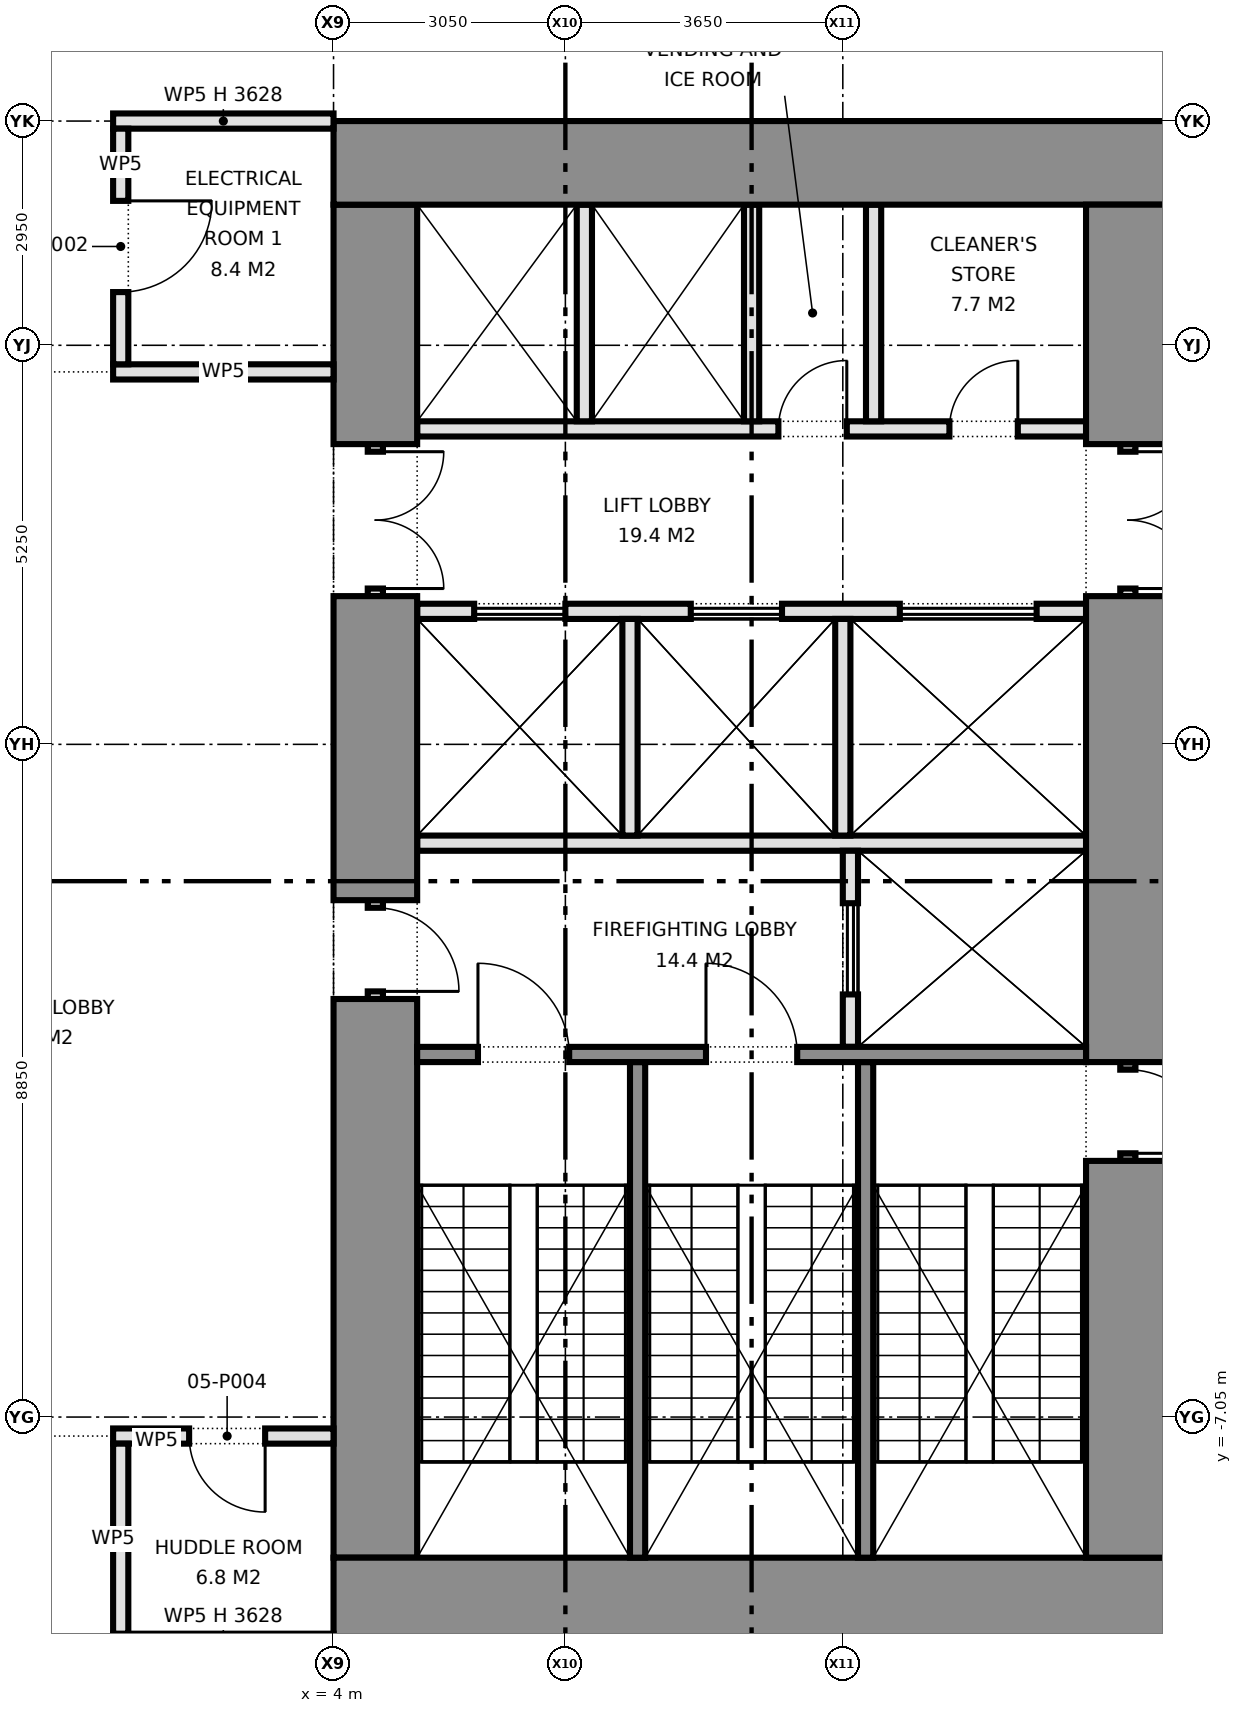
"""IFC4 building model, lengths in metres.
Left out: names, types, materials, properties, quantities, classifications, styles, units other than length and angle.
Written with IfcOpenShell. Run it as: python <this file> out.ifc"""

import sys

from ifc_helpers import new_model, si_unit, direction, frame, frame_2d, origin, place, context, subcontext, project, spatial, rectangle, extrude, element, fill, save


model = new_model("IFC4")
c1 = context("Model", 3, precision=1e-05, world=origin(), true_north=direction((0.0, 1.0)))
c2 = subcontext(c1, "Body", "Model", "MODEL_VIEW")
j1 = project(units=[si_unit("LENGTHUNIT", "METRE"), si_unit("PLANEANGLEUNIT", "RADIAN")], contexts=[c1])
p1 = place(None, origin())
s1 = spatial("IfcSite", under=j1, at=p1, CompositionType="ELEMENT")
p2 = place(p1, origin())
s2 = spatial("IfcBuilding", under=s1, at=p2, CompositionType="ELEMENT")
p3 = place(p2, frame((0.0, 0.0, 20.9)))
s3 = spatial("IfcBuildingStorey", under=s2, at=p3, CompositionType="ELEMENT", Elevation=20.9)
for number, where, z_axis, x_axis in (
    (1, (15.0, 9.45, 0.0), (0.0, 0.0, 1.0), (-1.0, 0.0, 0.0)),
    (2, (15.0, -9.45, 0.0), (0.0, 0.0, 1.0), (-1.0, 0.0, 0.0)),
):
    element("IfcWall", number, at=place(p3, frame(where, z_axis=z_axis, x_axis=x_axis)), inside=s3, PredefinedType="SHEAR", context=c2, shape_type="SweptSolid", body=[
        extrude(rectangle(XDim=11.0, YDim=1.1, at=frame_2d((5.5, 0.0))), origin(), (0.0, 0.0, 1.0), 4.575),
    ])
p4 = place(p3, frame((14.45, 8.9, 0.0), z_axis=(0.0, 0.0, 1.0), x_axis=(0.0, -1.0, 0.0)))
e3 = element("IfcWall", 3, at=p4, inside=s3, PredefinedType="SHEAR", context=c2, shape_type="SweptSolid", body=[
    extrude(rectangle(XDim=3.15, YDim=1.1, at=frame_2d((1.575, 0.0))), origin(), (0.0, 0.0, 1.0), 4.575),
])
p5 = place(p3, frame((14.45, 5.75, 0.0), z_axis=(0.0, 0.0, 1.0), x_axis=(0.0, -1.0, 0.0)))
e4 = element("IfcWall", 4, at=p5, inside=s3, PredefinedType="PARTITIONING", context=c2, shape_type="SweptSolid", body=[
    extrude(rectangle(XDim=2.0, YDim=0.2, at=frame_2d((1.0, 0.0))), origin(), (0.0, 0.0, 1.0), 2.4),
])
p6 = place(p5, frame((0.1, 0.0, 0.0)))
e5 = element("IfcOpeningElement", 5, at=p6, cuts=e4, PredefinedType="OPENING", context=c2, shape_type="SweptSolid", body=[
    extrude(rectangle(XDim=1.8, YDim=2.1, at=frame_2d((0.9, 1.05))), frame((0.0, 0.11, 0.0), z_axis=(0.0, -1.0, 0.0), x_axis=(1.0, 0.0, 0.0)), (0.0, 0.0, 1.0), 0.22),
])
p7 = place(p3, frame((14.45, 3.75, 0.0), z_axis=(0.0, 0.0, 1.0), x_axis=(0.0, -1.0, 0.0)))
e6 = element("IfcWall", 6, at=p7, inside=s3, PredefinedType="SHEAR", context=c2, shape_type="SweptSolid", body=[
    extrude(rectangle(XDim=6.13, YDim=1.1, at=frame_2d((3.065, 0.0))), origin(), (0.0, 0.0, 1.0), 4.575),
])
p8 = place(p3, frame((14.45, -2.38, 0.0), z_axis=(0.0, 0.0, 1.0), x_axis=(0.0, -1.0, 0.0)))
e7 = element("IfcWall", 7, at=p8, inside=s3, PredefinedType="SHEAR", context=c2, shape_type="SweptSolid", body=[
    extrude(rectangle(XDim=1.3, YDim=0.2, at=frame_2d((0.65, 0.0))), origin(), (0.0, 0.0, 1.0), 2.4),
])
p9 = place(p8, frame((0.1, 0.0, 0.0)))
e8 = element("IfcOpeningElement", 8, at=p9, cuts=e7, PredefinedType="OPENING", context=c2, shape_type="SweptSolid", body=[
    extrude(rectangle(XDim=1.1, YDim=2.1, at=frame_2d((0.55, 1.05))), frame((0.0, 0.11, 0.0), z_axis=(0.0, -1.0, 0.0), x_axis=(1.0, 0.0, 0.0)), (0.0, 0.0, 1.0), 0.22),
])
p10 = place(p3, frame((14.45, -3.68, 0.0), z_axis=(0.0, 0.0, 1.0), x_axis=(0.0, -1.0, 0.0)))
e9 = element("IfcWall", 9, at=p10, inside=s3, PredefinedType="SHEAR", context=c2, shape_type="SweptSolid", body=[
    extrude(rectangle(XDim=5.22, YDim=1.1, at=frame_2d((2.61, 0.0))), origin(), (0.0, 0.0, 1.0), 4.575),
])
p11 = place(p3, frame((4.55, 8.9, 0.0), z_axis=(0.0, 0.0, 1.0), x_axis=(0.0, -1.0, 0.0)))
e10 = element("IfcWall", 10, at=p11, inside=s3, PredefinedType="SHEAR", context=c2, shape_type="SweptSolid", body=[
    extrude(rectangle(XDim=3.15, YDim=1.1, at=frame_2d((1.575, 0.0))), origin(), (0.0, 0.0, 1.0), 4.575),
])
p12 = place(p3, frame((4.55, 5.75, 0.0), z_axis=(0.0, 0.0, 1.0), x_axis=(0.0, -1.0, 0.0)))
e11 = element("IfcWall", 11, at=p12, inside=s3, PredefinedType="PARTITIONING", context=c2, shape_type="SweptSolid", body=[
    extrude(rectangle(XDim=2.0, YDim=0.2, at=frame_2d((1.0, 0.0))), origin(), (0.0, 0.0, 1.0), 2.4),
])
p13 = place(p12, frame((0.1, 0.0, 0.0)))
e12 = element("IfcOpeningElement", 12, at=p13, cuts=e11, PredefinedType="OPENING", context=c2, shape_type="SweptSolid", body=[
    extrude(rectangle(XDim=1.8, YDim=2.1, at=frame_2d((0.9, 1.05))), frame((0.0, 0.11, 0.0), z_axis=(0.0, -1.0, 0.0), x_axis=(1.0, 0.0, 0.0)), (0.0, 0.0, 1.0), 0.22),
])
p14 = place(p3, frame((4.55, 3.75, 0.0), z_axis=(0.0, 0.0, 1.0), x_axis=(0.0, -1.0, 0.0)))
e13 = element("IfcWall", 13, at=p14, inside=s3, PredefinedType="SHEAR", context=c2, shape_type="SweptSolid", body=[
    extrude(rectangle(XDim=4.0, YDim=1.1, at=frame_2d((2.0, 0.0))), origin(), (0.0, 0.0, 1.0), 4.575),
])
p15 = place(p3, frame((4.55, -0.25, 0.0), z_axis=(0.0, 0.0, 1.0), x_axis=(0.0, -1.0, 0.0)))
e14 = element("IfcWall", 14, at=p15, inside=s3, PredefinedType="PARTITIONING", context=c2, shape_type="SweptSolid", body=[
    extrude(rectangle(XDim=1.3, YDim=0.2, at=frame_2d((0.65, 0.0))), origin(), (0.0, 0.0, 1.0), 2.4),
])
p16 = place(p15, frame((0.1, 0.0, 0.0)))
e15 = element("IfcOpeningElement", 15, at=p16, cuts=e14, PredefinedType="OPENING", context=c2, shape_type="SweptSolid", body=[
    extrude(rectangle(XDim=1.1, YDim=2.1, at=frame_2d((0.55, 1.05))), frame((0.0, 0.11, 0.0), z_axis=(0.0, -1.0, 0.0), x_axis=(1.0, 0.0, 0.0)), (0.0, 0.0, 1.0), 0.22),
])
p17 = place(p3, frame((4.55, -1.55, 0.0), z_axis=(0.0, 0.0, 1.0), x_axis=(0.0, -1.0, 0.0)))
e16 = element("IfcWall", 16, at=p17, inside=s3, PredefinedType="SHEAR", context=c2, shape_type="SweptSolid", body=[
    extrude(rectangle(XDim=7.35, YDim=1.1, at=frame_2d((3.675, 0.0))), origin(), (0.0, 0.0, 1.0), 4.575),
])
p18 = place(p3, frame((13.9, 5.95, 0.0), z_axis=(0.0, 0.0, 1.0), x_axis=(-1.0, 0.0, 0.0)))
e17 = element("IfcWall", 17, at=p18, inside=s3, PredefinedType="PARTITIONING", context=c2, shape_type="SweptSolid", body=[
    extrude(rectangle(XDim=8.8, YDim=0.2, at=frame_2d((4.4, 0.0))), origin(), (0.0, 0.0, 1.0), 4.575),
])
p19 = place(p18, frame((0.897, 0.0, 0.0)))
e18 = element("IfcOpeningElement", 18, at=p19, cuts=e17, PredefinedType="OPENING", context=c2, shape_type="SweptSolid", body=[
    extrude(rectangle(XDim=0.9, YDim=2.1, at=frame_2d((0.45, 1.05))), frame((0.0, 0.11, 0.0), z_axis=(0.0, -1.0, 0.0), x_axis=(1.0, 0.0, 0.0)), (0.0, 0.0, 1.0), 0.22),
])
p20 = place(p18, frame((3.147, 0.0, 0.0)))
e19 = element("IfcOpeningElement", 19, at=p20, cuts=e17, PredefinedType="OPENING", context=c2, shape_type="SweptSolid", body=[
    extrude(rectangle(XDim=0.9, YDim=2.1, at=frame_2d((0.45, 1.05))), frame((0.0, 0.11, 0.0), z_axis=(0.0, -1.0, 0.0), x_axis=(1.0, 0.0, 0.0)), (0.0, 0.0, 1.0), 0.22),
])
p21 = place(p3, frame((13.9, 3.55, 0.0), z_axis=(0.0, 0.0, 1.0), x_axis=(-1.0, 0.0, 0.0)))
e20 = element("IfcWall", 20, at=p21, inside=s3, PredefinedType="PARTITIONING", context=c2, shape_type="SweptSolid", body=[
    extrude(rectangle(XDim=8.8, YDim=0.2, at=frame_2d((4.4, 0.0))), origin(), (0.0, 0.0, 1.0), 4.575),
])
p22 = place(p21, frame((0.65, 0.0, 0.0)))
e21 = element("IfcOpeningElement", 21, at=p22, cuts=e20, PredefinedType="OPENING", context=c2, shape_type="SweptSolid", body=[
    extrude(rectangle(XDim=1.8, YDim=2.1, at=frame_2d((0.9, 1.05))), frame((0.0, 0.11, 0.0), z_axis=(0.0, -1.0, 0.0), x_axis=(1.0, 0.0, 0.0)), (0.0, 0.0, 1.0), 0.22),
])
p23 = place(p21, frame((4.0, 0.0, 0.0)))
e22 = element("IfcOpeningElement", 22, at=p23, cuts=e20, PredefinedType="OPENING", context=c2, shape_type="SweptSolid", body=[
    extrude(rectangle(XDim=1.2, YDim=2.1, at=frame_2d((0.6, 1.05))), frame((0.0, 0.11, 0.0), z_axis=(0.0, -1.0, 0.0), x_axis=(1.0, 0.0, 0.0)), (0.0, 0.0, 1.0), 0.22),
])
p24 = place(p21, frame((6.85, 0.0, 0.0)))
e23 = element("IfcOpeningElement", 23, at=p24, cuts=e20, PredefinedType="OPENING", context=c2, shape_type="SweptSolid", body=[
    extrude(rectangle(XDim=1.2, YDim=2.1, at=frame_2d((0.6, 1.05))), frame((0.0, 0.11, 0.0), z_axis=(0.0, -1.0, 0.0), x_axis=(1.0, 0.0, 0.0)), (0.0, 0.0, 1.0), 0.22),
])
p25 = place(p3, frame((13.9, 0.5, 0.0), z_axis=(0.0, 0.0, 1.0), x_axis=(-1.0, 0.0, 0.0)))
e24 = element("IfcWall", 24, at=p25, inside=s3, PredefinedType="PARTITIONING", context=c2, shape_type="SweptSolid", body=[
    extrude(rectangle(XDim=8.8, YDim=0.2, at=frame_2d((4.4, 0.0))), origin(), (0.0, 0.0, 1.0), 4.575),
])
p26 = place(p3, frame((10.8, 0.4, 0.0), z_axis=(0.0, 0.0, 1.0), x_axis=(0.0, -1.0, 0.0)))
e25 = element("IfcWall", 25, at=p26, inside=s3, PredefinedType="PARTITIONING", context=c2, shape_type="SweptSolid", body=[
    extrude(rectangle(XDim=2.58, YDim=0.2, at=frame_2d((1.29, 0.0))), origin(), (0.0, 0.0, 1.0), 4.575),
])
p27 = place(p26, frame((0.69, 0.0, 0.0)))
e26 = element("IfcOpeningElement", 26, at=p27, cuts=e25, PredefinedType="OPENING", context=c2, shape_type="SweptSolid", body=[
    extrude(rectangle(XDim=1.2, YDim=2.1, at=frame_2d((0.6, 1.05))), frame((0.0, 0.11, 0.0), z_axis=(0.0, -1.0, 0.0), x_axis=(1.0, 0.0, 0.0)), (0.0, 0.0, 1.0), 0.22),
])
p28 = place(p3, frame((13.9, -2.28, 0.0), z_axis=(0.0, 0.0, 1.0), x_axis=(-1.0, 0.0, 0.0)))
e27 = element("IfcWall", 27, at=p28, inside=s3, PredefinedType="SHEAR", context=c2, shape_type="SweptSolid", body=[
    extrude(rectangle(XDim=8.8, YDim=0.2, at=frame_2d((4.4, 0.0))), origin(), (0.0, 0.0, 1.0), 4.575),
])
p29 = place(p28, frame((3.8, 0.0, 0.0)))
e28 = element("IfcOpeningElement", 28, at=p29, cuts=e27, PredefinedType="OPENING", context=c2, shape_type="SweptSolid", body=[
    extrude(rectangle(XDim=1.2, YDim=2.1, at=frame_2d((0.6, 1.05))), frame((0.0, 0.11, 0.0), z_axis=(0.0, -1.0, 0.0), x_axis=(1.0, 0.0, 0.0)), (0.0, 0.0, 1.0), 0.22),
])
p30 = place(p28, frame((6.8, 0.0, 0.0)))
e29 = element("IfcOpeningElement", 29, at=p30, cuts=e27, PredefinedType="OPENING", context=c2, shape_type="SweptSolid", body=[
    extrude(rectangle(XDim=1.2, YDim=2.1, at=frame_2d((0.6, 1.05))), frame((0.0, 0.11, 0.0), z_axis=(0.0, -1.0, 0.0), x_axis=(1.0, 0.0, 0.0)), (0.0, 0.0, 1.0), 0.22),
])
for number, where, z_axis, x_axis in (
    (30, (11.0, -2.38, 0.0), (0.0, 0.0, 1.0), (0.0, -1.0, 0.0)),
    (31, (8.0, -2.38, 0.0), (0.0, 0.0, 1.0), (0.0, -1.0, 0.0)),
):
    element("IfcWall", number, at=place(p3, frame(where, z_axis=z_axis, x_axis=x_axis)), inside=s3, PredefinedType="SHEAR", context=c2, shape_type="SweptSolid", body=[
        extrude(rectangle(XDim=6.52, YDim=0.2, at=frame_2d((3.26, 0.0))), origin(), (0.0, 0.0, 1.0), 4.575),
    ])
for number, where, z_axis, x_axis in (
    (32, (9.5, 8.9, 0.0), (0.0, 0.0, 1.0), (0.0, -1.0, 0.0)),
    (33, (7.3, 8.9, 0.0), (0.0, 0.0, 1.0), (0.0, -1.0, 0.0)),
    (34, (11.105, 8.9, 0.0), (0.0, 0.0, 1.0), (0.0, -1.0, 0.0)),
    (35, (10.7, 3.45, 0.0), (0.0, 0.0, 1.0), (0.0, -1.0, 0.0)),
    (36, (7.9, 3.45, 0.0), (0.0, 0.0, 1.0), (0.0, -1.0, 0.0)),
):
    element("IfcWall", number, at=place(p3, frame(where, z_axis=z_axis, x_axis=x_axis)), inside=s3, PredefinedType="PARTITIONING", context=c2, shape_type="SweptSolid", body=[
        extrude(rectangle(XDim=2.85, YDim=0.2, at=frame_2d((1.425, 0.0))), origin(), (0.0, 0.0, 1.0), 4.575),
    ])
p31 = place(p3, frame((1.1, -7.3, 0.0), z_axis=(0.0, 0.0, 1.0), x_axis=(1.0, 0.0, 0.0)))
e37 = element("IfcWall", 37, at=p31, inside=s3, PredefinedType="PARTITIONING", context=c2, shape_type="SweptSolid", body=[
    extrude(rectangle(XDim=2.9, YDim=0.2, at=frame_2d((1.45, 0.0))), origin(), (0.0, 0.0, 1.0), 4.575),
])
p32 = place(p31, frame((1.0, 0.0, 0.0)))
e38 = element("IfcOpeningElement", 38, at=p32, cuts=e37, PredefinedType="OPENING", context=c2, shape_type="SweptSolid", body=[
    extrude(rectangle(XDim=1.0, YDim=2.1, at=frame_2d((0.5, 1.05))), frame((0.0, 0.11, 0.0), z_axis=(0.0, -1.0, 0.0), x_axis=(1.0, 0.0, 0.0)), (0.0, 0.0, 1.0), 0.22),
])
p33 = place(p3, frame((1.1, 6.7, 0.0), z_axis=(0.0, 0.0, 1.0), x_axis=(1.0, 0.0, 0.0)))
e39 = element("IfcWall", 39, at=p33, inside=s3, PredefinedType="PARTITIONING", context=c2, shape_type="SweptSolid", body=[
    extrude(rectangle(XDim=2.9, YDim=0.2, at=frame_2d((1.45, 0.0))), origin(), (0.0, 0.0, 1.0), 4.575),
])
p34 = place(p3, frame((1.1, 10.0, 0.0), z_axis=(0.0, 0.0, 1.0), x_axis=(1.0, 0.0, 0.0)))
e40 = element("IfcWall", 40, at=p34, inside=s3, PredefinedType="PARTITIONING", context=c2, shape_type="SweptSolid", body=[
    extrude(rectangle(XDim=2.9, YDim=0.2, at=frame_2d((1.45, 0.0))), origin(), (0.0, 0.0, 1.0), 3.628),
])
p35 = place(p3, frame((1.2, -9.9, 0.0), z_axis=(0.0, 0.0, 1.0), x_axis=(0.0, 1.0, 0.0)))
e41 = element("IfcWall", 41, at=p35, inside=s3, PredefinedType="PARTITIONING", context=c2, shape_type="SweptSolid", body=[
    extrude(rectangle(XDim=2.5, YDim=0.2, at=frame_2d((1.25, 0.0))), origin(), (0.0, 0.0, 1.0), 4.575),
])
p36 = place(p3, frame((1.2, 6.8, 0.0), z_axis=(0.0, 0.0, 1.0), x_axis=(0.0, 1.0, 0.0)))
e42 = element("IfcWall", 42, at=p36, inside=s3, PredefinedType="PARTITIONING", context=c2, shape_type="SweptSolid", body=[
    extrude(rectangle(XDim=3.1, YDim=0.2, at=frame_2d((1.55, 0.0))), origin(), (0.0, 0.0, 1.0), 4.575),
])
p37 = place(p36, frame((0.95, 0.0, 0.0)))
e43 = element("IfcOpeningElement", 43, at=p37, cuts=e42, PredefinedType="OPENING", context=c2, shape_type="SweptSolid", body=[
    extrude(rectangle(XDim=1.2, YDim=2.1, at=frame_2d((0.6, 1.05))), frame((0.0, 0.11, 0.0), z_axis=(0.0, -1.0, 0.0), x_axis=(1.0, 0.0, 0.0)), (0.0, 0.0, 1.0), 0.22),
])
p38 = place(p6, origin())
e44 = element("IfcDoor", 44, at=p38, inside=s3, OperationType="DOUBLE_DOOR_SINGLE_SWING", PredefinedType="DOOR", context=c2, shape_type="SweptSolid", body=[
    extrude(rectangle(XDim=1.8, YDim=2.1, at=frame_2d((0.9, 1.05))), frame((0.0, 0.025, 0.0), z_axis=(0.0, -1.0, 0.0), x_axis=(1.0, 0.0, 0.0)), (0.0, 0.0, 1.0), 0.05),
])
fill(e5, e44)
p39 = place(p9, origin())
e45 = element("IfcDoor", 45, at=p39, inside=s3, OperationType="SINGLE_SWING_RIGHT", PredefinedType="DOOR", context=c2, shape_type="SweptSolid", body=[
    extrude(rectangle(XDim=1.1, YDim=2.1, at=frame_2d((0.55, 1.05))), frame((0.0, 0.025, 0.0), z_axis=(0.0, -1.0, 0.0), x_axis=(1.0, 0.0, 0.0)), (0.0, 0.0, 1.0), 0.05),
])
fill(e8, e45)
p40 = place(p13, origin())
e46 = element("IfcDoor", 46, at=p40, inside=s3, OperationType="DOUBLE_DOOR_SINGLE_SWING", PredefinedType="DOOR", context=c2, shape_type="SweptSolid", body=[
    extrude(rectangle(XDim=1.8, YDim=2.1, at=frame_2d((0.9, 1.05))), frame((0.0, 0.025, 0.0), z_axis=(0.0, -1.0, 0.0), x_axis=(1.0, 0.0, 0.0)), (0.0, 0.0, 1.0), 0.05),
])
fill(e12, e46)
p41 = place(p16, origin())
e47 = element("IfcDoor", 47, at=p41, inside=s3, OperationType="SINGLE_SWING_RIGHT", PredefinedType="DOOR", context=c2, shape_type="SweptSolid", body=[
    extrude(rectangle(XDim=1.1, YDim=2.1, at=frame_2d((0.55, 1.05))), frame((0.0, 0.025, 0.0), z_axis=(0.0, -1.0, 0.0), x_axis=(1.0, 0.0, 0.0)), (0.0, 0.0, 1.0), 0.05),
])
fill(e15, e47)
p42 = place(p22, origin())
e48 = element("IfcDoor", 48, at=p42, inside=s3, OperationType="DOUBLE_DOOR_SLIDING", PredefinedType="DOOR", context=c2, shape_type="SweptSolid", body=[
    extrude(rectangle(XDim=1.8, YDim=2.1, at=frame_2d((0.9, 1.05))), frame((0.0, 0.025, 0.0), z_axis=(0.0, -1.0, 0.0), x_axis=(1.0, 0.0, 0.0)), (0.0, 0.0, 1.0), 0.05),
])
fill(e21, e48)
p43 = place(p23, origin())
e49 = element("IfcDoor", 49, at=p43, inside=s3, OperationType="DOUBLE_DOOR_SLIDING", PredefinedType="DOOR", context=c2, shape_type="SweptSolid", body=[
    extrude(rectangle(XDim=1.2, YDim=2.1, at=frame_2d((0.6, 1.05))), frame((0.0, 0.025, 0.0), z_axis=(0.0, -1.0, 0.0), x_axis=(1.0, 0.0, 0.0)), (0.0, 0.0, 1.0), 0.05),
])
fill(e22, e49)
p44 = place(p24, origin())
e50 = element("IfcDoor", 50, at=p44, inside=s3, OperationType="DOUBLE_DOOR_SLIDING", PredefinedType="DOOR", context=c2, shape_type="SweptSolid", body=[
    extrude(rectangle(XDim=1.2, YDim=2.1, at=frame_2d((0.6, 1.05))), frame((0.0, 0.025, 0.0), z_axis=(0.0, -1.0, 0.0), x_axis=(1.0, 0.0, 0.0)), (0.0, 0.0, 1.0), 0.05),
])
fill(e23, e50)
p45 = place(p27, origin())
e51 = element("IfcDoor", 51, at=p45, inside=s3, OperationType="DOUBLE_DOOR_SLIDING", PredefinedType="DOOR", context=c2, shape_type="SweptSolid", body=[
    extrude(rectangle(XDim=1.2, YDim=2.1, at=frame_2d((0.6, 1.05))), frame((0.0, 0.025, 0.0), z_axis=(0.0, -1.0, 0.0), x_axis=(1.0, 0.0, 0.0)), (0.0, 0.0, 1.0), 0.05),
])
fill(e26, e51)
p46 = place(p19, frame((0.9, 0.0, 0.0), z_axis=(0.0, 0.0, 1.0), x_axis=(-1.0, 0.0, 0.0)))
e52 = element("IfcDoor", 52, at=p46, inside=s3, OperationType="SINGLE_SWING_RIGHT", PredefinedType="DOOR", context=c2, shape_type="SweptSolid", body=[
    extrude(rectangle(XDim=0.9, YDim=2.1, at=frame_2d((0.45, 1.05))), frame((0.0, 0.025, 0.0), z_axis=(0.0, -1.0, 0.0), x_axis=(1.0, 0.0, 0.0)), (0.0, 0.0, 1.0), 0.05),
])
fill(e18, e52)
p47 = place(p20, frame((0.9, 0.0, 0.0), z_axis=(0.0, 0.0, 1.0), x_axis=(-1.0, 0.0, 0.0)))
e53 = element("IfcDoor", 53, at=p47, inside=s3, OperationType="SINGLE_SWING_RIGHT", PredefinedType="DOOR", context=c2, shape_type="SweptSolid", body=[
    extrude(rectangle(XDim=0.9, YDim=2.1, at=frame_2d((0.45, 1.05))), frame((0.0, 0.025, 0.0), z_axis=(0.0, -1.0, 0.0), x_axis=(1.0, 0.0, 0.0)), (0.0, 0.0, 1.0), 0.05),
])
fill(e19, e53)
p48 = place(p29, frame((1.2, 0.0, 0.0), z_axis=(0.0, 0.0, 1.0), x_axis=(-1.0, 0.0, 0.0)))
e54 = element("IfcDoor", 54, at=p48, inside=s3, OperationType="SINGLE_SWING_LEFT", PredefinedType="DOOR", context=c2, shape_type="SweptSolid", body=[
    extrude(rectangle(XDim=1.2, YDim=2.1, at=frame_2d((0.6, 1.05))), frame((0.0, 0.025, 0.0), z_axis=(0.0, -1.0, 0.0), x_axis=(1.0, 0.0, 0.0)), (0.0, 0.0, 1.0), 0.05),
])
fill(e28, e54)
p49 = place(p30, frame((1.2, 0.0, 0.0), z_axis=(0.0, 0.0, 1.0), x_axis=(-1.0, 0.0, 0.0)))
e55 = element("IfcDoor", 55, at=p49, inside=s3, OperationType="SINGLE_SWING_LEFT", PredefinedType="DOOR", context=c2, shape_type="SweptSolid", body=[
    extrude(rectangle(XDim=1.2, YDim=2.1, at=frame_2d((0.6, 1.05))), frame((0.0, 0.025, 0.0), z_axis=(0.0, -1.0, 0.0), x_axis=(1.0, 0.0, 0.0)), (0.0, 0.0, 1.0), 0.05),
])
fill(e29, e55)
p50 = place(p37, frame((1.2, 0.0, 0.0), z_axis=(0.0, 0.0, 1.0), x_axis=(-1.0, 0.0, 0.0)))
e56 = element("IfcDoor", 56, at=p50, inside=s3, OperationType="SINGLE_SWING_LEFT", PredefinedType="DOOR", context=c2, shape_type="SweptSolid", body=[
    extrude(rectangle(XDim=1.2, YDim=2.1, at=frame_2d((0.6, 1.05))), frame((0.0, 0.025, 0.0), z_axis=(0.0, -1.0, 0.0), x_axis=(1.0, 0.0, 0.0)), (0.0, 0.0, 1.0), 0.05),
])
fill(e43, e56)
p51 = place(p32, frame((1.0, 0.0, 0.0), z_axis=(0.0, 0.0, 1.0), x_axis=(-1.0, 0.0, 0.0)))
e57 = element("IfcDoor", 57, at=p51, inside=s3, OperationType="SINGLE_SWING_LEFT", PredefinedType="DOOR", context=c2, shape_type="SweptSolid", body=[
    extrude(rectangle(XDim=1.0, YDim=2.1, at=frame_2d((0.5, 1.05))), frame((0.0, 0.025, 0.0), z_axis=(0.0, -1.0, 0.0), x_axis=(1.0, 0.0, 0.0)), (0.0, 0.0, 1.0), 0.05),
])
fill(e38, e57)
save(model, sys.argv[1])
